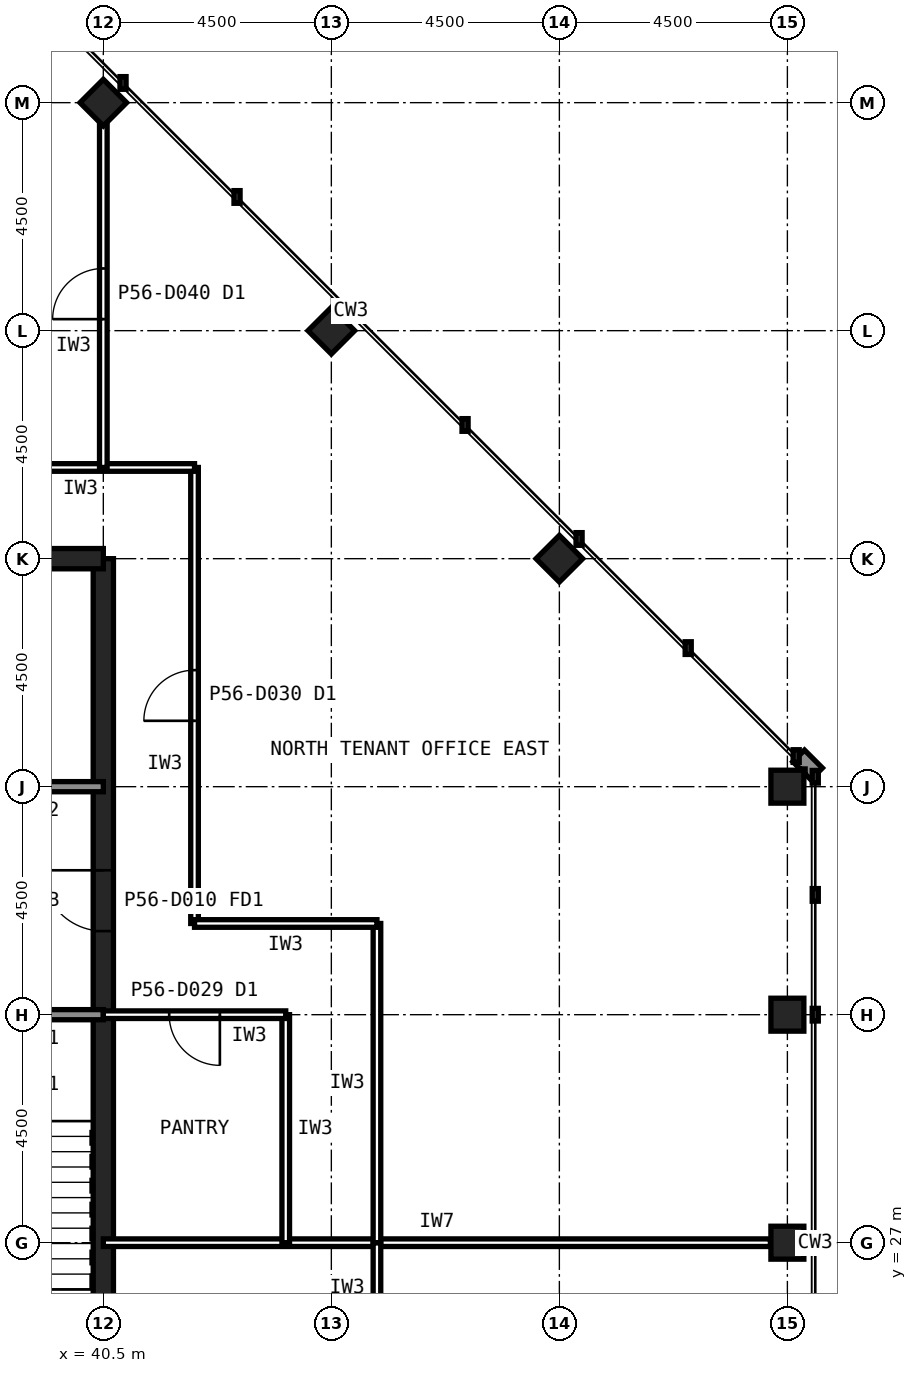
"""IFC4 building model, lengths in metres.
Left out: names, types, materials, properties, quantities, classifications, styles, units other than length and angle.
Written with IfcOpenShell. Run it as: python <this file> out.ifc"""

import sys

from ifc_helpers import new_model, si_unit, direction, frame, frame_2d, origin, origin_2d, place, context, subcontext, project, spatial, rectangle, hollow_rectangle, extrude, element, fill, save


model = new_model("IFC4")
c1 = context("Model", 3, precision=1e-05, world=origin(), true_north=direction((0.0, 1.0)))
c2 = subcontext(c1, "Body", "Model", "MODEL_VIEW")
j1 = project(units=[si_unit("LENGTHUNIT", "METRE"), si_unit("PLANEANGLEUNIT", "RADIAN")], contexts=[c1])
p1 = place(None, origin())
s1 = spatial("IfcSite", under=j1, at=p1, CompositionType="ELEMENT")
p2 = place(p1, origin())
s2 = spatial("IfcBuilding", under=s1, at=p2, CompositionType="ELEMENT")
p3 = place(p2, frame((0.0, 0.0, 238.6)))
s3 = spatial("IfcBuildingStorey", under=s2, at=p3, CompositionType="ELEMENT", Elevation=238.6)
for number, where, z_axis, x_axis in (
    (1, (54.0, 27.0, 0.0), (0.0, 0.0, 1.0), (1.0, 0.0, 0.0)),
    (2, (54.0, 31.5, 0.0), (0.0, 0.0, 1.0), (1.0, 0.0, 0.0)),
    (3, (54.0, 36.0, 0.0), (0.0, 0.0, 1.0), (1.0, 0.0, 0.0)),
    (4, (49.5, 40.5, 0.0), (0.0, 0.0, 1.0), (0.707, 0.707, 0.0)),
    (5, (45.0, 45.0, 0.0), (0.0, 0.0, 1.0), (0.707, 0.707, 0.0)),
    (6, (40.5, 49.5, 0.0), (0.0, 0.0, 1.0), (0.707, 0.707, 0.0)),
):
    element("IfcColumn", number, at=place(p3, frame(where, z_axis=z_axis, x_axis=x_axis)), inside=s3, PredefinedType="COLUMN", context=c2, shape_type="SweptSolid", body=[
        extrude(hollow_rectangle(XDim=0.65, YDim=0.65, WallThickness=0.032, at=origin_2d()), origin(), (0.0, 0.0, 1.0), 4.0),
    ])
p4 = place(p3, frame((40.5, 13.5, 0.0), z_axis=(0.0, 0.0, 1.0), x_axis=(0.0, 1.0, 0.0)))
e7 = element("IfcWall", 7, at=p4, inside=s3, PredefinedType="SHEAR", context=c2, shape_type="SweptSolid", body=[
    extrude(rectangle(XDim=27.0, YDim=0.4, at=frame_2d((13.5, 0.0))), origin(), (0.0, 0.0, 1.0), 4.0),
])
p5 = place(p4, frame((5.85, 0.0, 0.0)))
e8 = element("IfcOpeningElement", 8, at=p5, cuts=e7, PredefinedType="OPENING", context=c2, shape_type="SweptSolid", body=[
    extrude(rectangle(XDim=1.8, YDim=2.1, at=frame_2d((0.9, 1.05))), frame((0.0, 0.21, 0.0), z_axis=(0.0, -1.0, 0.0), x_axis=(1.0, 0.0, 0.0)), (0.0, 0.0, 1.0), 0.42),
])
p6 = place(p4, frame((19.65, 0.0, 0.0)))
e9 = element("IfcOpeningElement", 9, at=p6, cuts=e7, PredefinedType="OPENING", context=c2, shape_type="SweptSolid", body=[
    extrude(rectangle(XDim=1.2, YDim=2.1, at=frame_2d((0.6, 1.05))), frame((0.0, 0.21, 0.0), z_axis=(0.0, -1.0, 0.0), x_axis=(1.0, 0.0, 0.0)), (0.0, 0.0, 1.0), 0.42),
])
p7 = place(p3, frame((40.5, 40.5, 0.0), z_axis=(0.0, 0.0, 1.0), x_axis=(-1.0, 0.0, 0.0)))
e10 = element("IfcWall", 10, at=p7, inside=s3, PredefinedType="SHEAR", context=c2, shape_type="SweptSolid", body=[
    extrude(rectangle(XDim=27.0, YDim=0.4, at=frame_2d((13.5, 0.0))), origin(), (0.0, 0.0, 1.0), 4.0),
])
p8 = place(p3, frame((13.5, 36.0, 0.0), z_axis=(0.0, 0.0, 1.0), x_axis=(1.0, 0.0, 0.0)))
e11 = element("IfcWall", 11, at=p8, inside=s3, PredefinedType="SOLIDWALL", context=c2, shape_type="SweptSolid", body=[
    extrude(rectangle(XDim=27.0, YDim=0.2, at=frame_2d((13.5, 0.0))), origin(), (0.0, 0.0, 1.0), 3.84),
])
p9 = place(p8, frame((1.8, 0.0, 0.0)))
e12 = element("IfcOpeningElement", 12, at=p9, cuts=e11, PredefinedType="OPENING", context=c2, shape_type="SweptSolid", body=[
    extrude(rectangle(XDim=0.9, YDim=2.1, at=frame_2d((0.45, 1.05))), frame((0.0, 0.11, 0.0), z_axis=(0.0, -1.0, 0.0), x_axis=(1.0, 0.0, 0.0)), (0.0, 0.0, 1.0), 0.22),
])
p10 = place(p8, frame((5.55, 0.0, 0.0)))
e13 = element("IfcOpeningElement", 13, at=p10, cuts=e11, PredefinedType="OPENING", context=c2, shape_type="SweptSolid", body=[
    extrude(rectangle(XDim=0.9, YDim=2.1, at=frame_2d((0.45, 1.05))), frame((0.0, 0.11, 0.0), z_axis=(0.0, -1.0, 0.0), x_axis=(1.0, 0.0, 0.0)), (0.0, 0.0, 1.0), 0.22),
])
p11 = place(p8, frame((14.55, 0.0, 0.0)))
e14 = element("IfcOpeningElement", 14, at=p11, cuts=e11, PredefinedType="OPENING", context=c2, shape_type="SweptSolid", body=[
    extrude(rectangle(XDim=0.9, YDim=2.1, at=frame_2d((0.45, 1.05))), frame((0.0, 0.11, 0.0), z_axis=(0.0, -1.0, 0.0), x_axis=(1.0, 0.0, 0.0)), (0.0, 0.0, 1.0), 0.22),
])
p12 = place(p8, frame((17.55, 0.0, 0.0)))
e15 = element("IfcOpeningElement", 15, at=p12, cuts=e11, PredefinedType="OPENING", context=c2, shape_type="SweptSolid", body=[
    extrude(rectangle(XDim=0.9, YDim=2.1, at=frame_2d((0.45, 1.05))), frame((0.0, 0.11, 0.0), z_axis=(0.0, -1.0, 0.0), x_axis=(1.0, 0.0, 0.0)), (0.0, 0.0, 1.0), 0.22),
])
p13 = place(p8, frame((20.55, 0.0, 0.0)))
e16 = element("IfcOpeningElement", 16, at=p13, cuts=e11, PredefinedType="OPENING", context=c2, shape_type="SweptSolid", body=[
    extrude(rectangle(XDim=0.9, YDim=2.1, at=frame_2d((0.45, 1.05))), frame((0.0, 0.11, 0.0), z_axis=(0.0, -1.0, 0.0), x_axis=(1.0, 0.0, 0.0)), (0.0, 0.0, 1.0), 0.22),
])
p14 = place(p8, frame((24.1, 0.0, 0.0)))
e17 = element("IfcOpeningElement", 17, at=p14, cuts=e11, PredefinedType="OPENING", context=c2, shape_type="SweptSolid", body=[
    extrude(rectangle(XDim=1.3, YDim=2.2, at=frame_2d((0.65, 1.1))), frame((0.0, 0.11, 0.0), z_axis=(0.0, -1.0, 0.0), x_axis=(1.0, 0.0, 0.0)), (0.0, 0.0, 1.0), 0.22),
])
p15 = place(p3, frame((13.5, 31.5, 0.0), z_axis=(0.0, 0.0, 1.0), x_axis=(1.0, 0.0, 0.0)))
e18 = element("IfcWall", 18, at=p15, inside=s3, PredefinedType="SOLIDWALL", context=c2, shape_type="SweptSolid", body=[
    extrude(rectangle(XDim=27.0, YDim=0.2, at=frame_2d((13.5, 0.0))), origin(), (0.0, 0.0, 1.0), 3.84),
])
p16 = place(p15, frame((24.15, 0.0, 0.0)))
e19 = element("IfcOpeningElement", 19, at=p16, cuts=e18, PredefinedType="OPENING", context=c2, shape_type="SweptSolid", body=[
    extrude(rectangle(XDim=1.2, YDim=2.1, at=frame_2d((0.6, 1.05))), frame((0.0, 0.11, 0.0), z_axis=(0.0, -1.0, 0.0), x_axis=(1.0, 0.0, 0.0)), (0.0, 0.0, 1.0), 0.22),
])
p17 = place(p15, frame((15.3, 0.0, 0.0)))
e20 = element("IfcOpeningElement", 20, at=p17, cuts=e18, PredefinedType="OPENING", context=c2, shape_type="SweptSolid", body=[
    extrude(rectangle(XDim=0.9, YDim=2.1, at=frame_2d((0.45, 1.05))), frame((0.0, 0.11, 0.0), z_axis=(0.0, -1.0, 0.0), x_axis=(1.0, 0.0, 0.0)), (0.0, 0.0, 1.0), 0.22),
])
p18 = place(p15, frame((19.8, 0.0, 0.0)))
e21 = element("IfcOpeningElement", 21, at=p18, cuts=e18, PredefinedType="OPENING", context=c2, shape_type="SweptSolid", body=[
    extrude(rectangle(XDim=0.9, YDim=2.1, at=frame_2d((0.45, 1.05))), frame((0.0, 0.11, 0.0), z_axis=(0.0, -1.0, 0.0), x_axis=(1.0, 0.0, 0.0)), (0.0, 0.0, 1.0), 0.22),
])
p19 = place(p3, frame((40.5, 27.0, 0.0), z_axis=(0.0, 0.0, 1.0), x_axis=(1.0, 0.0, 0.0)))
e22 = element("IfcWall", 22, at=p19, inside=s3, PredefinedType="PARTITIONING", context=c2, shape_type="SweptSolid", body=[
    extrude(rectangle(XDim=13.165, YDim=0.15, at=frame_2d((6.583, 0.0))), origin(), (0.0, 0.0, 1.0), 2.989),
])
p20 = place(p3, frame((45.9, 25.2, 0.0), z_axis=(0.0, 0.0, 1.0), x_axis=(0.0, 1.0, 0.0)))
e23 = element("IfcWall", 23, at=p20, inside=s3, PredefinedType="PARTITIONING", context=c2, shape_type="SweptSolid", body=[
    extrude(rectangle(XDim=1.8, YDim=0.15, at=frame_2d((0.9, 0.0))), origin(), (0.0, 0.0, 1.0), 3.84),
])
p21 = place(p3, frame((42.3, 33.3, 0.0), z_axis=(0.0, 0.0, 1.0), x_axis=(0.0, 1.0, 0.0)))
e24 = element("IfcWall", 24, at=p21, inside=s3, PredefinedType="PARTITIONING", context=c2, shape_type="SweptSolid", body=[
    extrude(rectangle(XDim=9.0, YDim=0.15, at=frame_2d((4.5, 0.0))), origin(), (0.0, 0.0, 1.0), 3.84),
])
p22 = place(p21, frame((4.0, 0.0, 0.0)))
e25 = element("IfcOpeningElement", 25, at=p22, cuts=e24, PredefinedType="OPENING", context=c2, shape_type="SweptSolid", body=[
    extrude(rectangle(XDim=1.0, YDim=2.1, at=frame_2d((0.5, 1.05))), frame((0.0, 0.085, 0.0), z_axis=(0.0, -1.0, 0.0), x_axis=(1.0, 0.0, 0.0)), (0.0, 0.0, 1.0), 0.17),
])
p23 = place(p3, frame((45.9, 27.0, 0.0), z_axis=(0.0, 0.0, 1.0), x_axis=(0.0, 1.0, 0.0)))
e26 = element("IfcWall", 26, at=p23, inside=s3, PredefinedType="PARTITIONING", context=c2, shape_type="SweptSolid", body=[
    extrude(rectangle(XDim=6.3, YDim=0.15, at=frame_2d((3.15, 0.0))), origin(), (0.0, 0.0, 1.0), 3.84),
])
p24 = place(p3, frame((42.3, 42.3, 0.0), z_axis=(0.0, 0.0, 1.0), x_axis=(-1.0, 0.0, 0.0)))
e27 = element("IfcWall", 27, at=p24, inside=s3, PredefinedType="PARTITIONING", context=c2, shape_type="SweptSolid", body=[
    extrude(rectangle(XDim=4.5, YDim=0.15, at=frame_2d((2.25, 0.0))), origin(), (0.0, 0.0, 1.0), 3.84),
])
p25 = place(p3, frame((45.9, 33.3, 0.0), z_axis=(0.0, 0.0, 1.0), x_axis=(-1.0, 0.0, 0.0)))
e28 = element("IfcWall", 28, at=p25, inside=s3, PredefinedType="PARTITIONING", context=c2, shape_type="SweptSolid", body=[
    extrude(rectangle(XDim=3.6, YDim=0.15, at=frame_2d((1.8, 0.0))), origin(), (0.0, 0.0, 1.0), 3.84),
])
p26 = place(p3, frame((44.1, 27.0, 0.0), z_axis=(0.0, 0.0, 1.0), x_axis=(0.0, 1.0, 0.0)))
e29 = element("IfcWall", 29, at=p26, inside=s3, PredefinedType="PARTITIONING", context=c2, shape_type="SweptSolid", body=[
    extrude(rectangle(XDim=4.5, YDim=0.15, at=frame_2d((2.25, 0.0))), origin(), (0.0, 0.0, 1.0), 3.84),
])
p27 = place(p3, frame((44.1, 31.5, 0.0), z_axis=(0.0, 0.0, 1.0), x_axis=(-1.0, 0.0, 0.0)))
e30 = element("IfcWall", 30, at=p27, inside=s3, PredefinedType="PARTITIONING", context=c2, shape_type="SweptSolid", body=[
    extrude(rectangle(XDim=3.6, YDim=0.15, at=frame_2d((1.8, 0.0))), origin(), (0.0, 0.0, 1.0), 2.989),
])
p28 = place(p27, frame((1.3, 0.0, 0.0)))
e31 = element("IfcOpeningElement", 31, at=p28, cuts=e30, PredefinedType="OPENING", context=c2, shape_type="SweptSolid", body=[
    extrude(rectangle(XDim=1.0, YDim=2.1, at=frame_2d((0.5, 1.05))), frame((0.0, 0.085, 0.0), z_axis=(0.0, -1.0, 0.0), x_axis=(1.0, 0.0, 0.0)), (0.0, 0.0, 1.0), 0.17),
])
p29 = place(p3, frame((40.5, 42.3, 0.0), z_axis=(0.0, 0.0, 1.0), x_axis=(0.0, 1.0, 0.0)))
e32 = element("IfcWall", 32, at=p29, inside=s3, PredefinedType="PARTITIONING", context=c2, shape_type="SweptSolid", body=[
    extrude(rectangle(XDim=6.855, YDim=0.15, at=frame_2d((3.427, 0.0))), origin(), (0.0, 0.0, 1.0), 2.989),
])
p30 = place(p29, frame((2.927, 0.0, 0.0)))
e33 = element("IfcOpeningElement", 33, at=p30, cuts=e32, PredefinedType="OPENING", context=c2, shape_type="SweptSolid", body=[
    extrude(rectangle(XDim=1.0, YDim=2.1, at=frame_2d((0.5, 1.05))), frame((0.0, 0.085, 0.0), z_axis=(0.0, -1.0, 0.0), x_axis=(1.0, 0.0, 0.0)), (0.0, 0.0, 1.0), 0.17),
])
p31 = place(p6, origin())
e34 = element("IfcDoor", 34, at=p31, inside=s3, OperationType="SINGLE_SWING_RIGHT", PredefinedType="DOOR", context=c2, shape_type="SweptSolid", body=[
    extrude(rectangle(XDim=1.2, YDim=2.1, at=frame_2d((0.6, 1.05))), frame((0.0, 0.025, 0.0), z_axis=(0.0, -1.0, 0.0), x_axis=(1.0, 0.0, 0.0)), (0.0, 0.0, 1.0), 0.05),
])
fill(e9, e34)
p32 = place(p22, origin())
e35 = element("IfcDoor", 35, at=p32, inside=s3, OperationType="SINGLE_SWING_LEFT", PredefinedType="DOOR", context=c2, shape_type="SweptSolid", body=[
    extrude(rectangle(XDim=1.0, YDim=2.1, at=frame_2d((0.5, 1.05))), frame((0.0, 0.025, 0.0), z_axis=(0.0, -1.0, 0.0), x_axis=(1.0, 0.0, 0.0)), (0.0, 0.0, 1.0), 0.05),
])
fill(e25, e35)
p33 = place(p28, origin())
e36 = element("IfcDoor", 36, at=p33, inside=s3, OperationType="SINGLE_SWING_LEFT", PredefinedType="DOOR", context=c2, shape_type="SweptSolid", body=[
    extrude(rectangle(XDim=1.0, YDim=2.1, at=frame_2d((0.5, 1.05))), frame((0.0, 0.025, 0.0), z_axis=(0.0, -1.0, 0.0), x_axis=(1.0, 0.0, 0.0)), (0.0, 0.0, 1.0), 0.05),
])
fill(e31, e36)
p34 = place(p30, origin())
e37 = element("IfcDoor", 37, at=p34, inside=s3, OperationType="SINGLE_SWING_LEFT", PredefinedType="DOOR", context=c2, shape_type="SweptSolid", body=[
    extrude(rectangle(XDim=1.0, YDim=2.1, at=frame_2d((0.5, 1.05))), frame((0.0, 0.025, 0.0), z_axis=(0.0, -1.0, 0.0), x_axis=(1.0, 0.0, 0.0)), (0.0, 0.0, 1.0), 0.05),
])
fill(e33, e37)
save(model, sys.argv[1])
